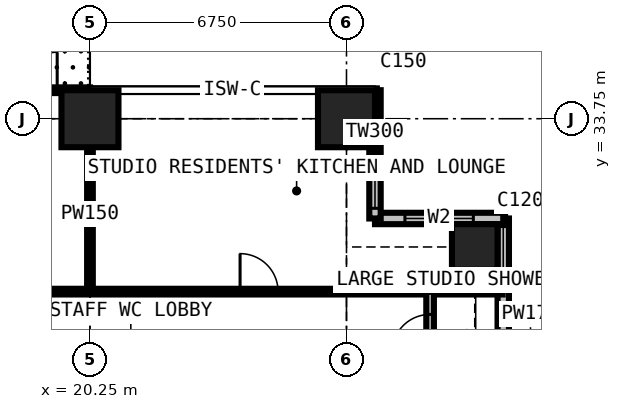
"""IFC4 building model, lengths in metres.
Left out: names, types, materials, properties, quantities, classifications, styles, units other than length and angle.
Written with IfcOpenShell. Run it as: python <this file> out.ifc"""

import sys

from ifc_helpers import new_model, si_unit, direction, frame, frame_2d, origin, origin_2d, place, context, subcontext, project, spatial, rectangle, extrude, element, fill, save


model = new_model("IFC4")
c1 = context("Model", 3, precision=1e-05, world=origin(), true_north=direction((0.0, 1.0)))
c2 = subcontext(c1, "Body", "Model", "MODEL_VIEW")
j1 = project(units=[si_unit("LENGTHUNIT", "METRE"), si_unit("PLANEANGLEUNIT", "RADIAN")], contexts=[c1])
p1 = place(None, origin())
s1 = spatial("IfcSite", under=j1, at=p1, CompositionType="ELEMENT")
p2 = place(p1, origin())
s2 = spatial("IfcBuilding", under=s1, at=p2, CompositionType="ELEMENT")
p3 = place(p2, frame((0.0, 0.0, 149.4)))
s3 = spatial("IfcBuildingStorey", under=s2, at=p3, CompositionType="ELEMENT", Elevation=149.4)
for number, where, z_axis, x_axis in (
    (1, (20.25, 33.75, 0.0), (0.0, 0.0, 1.0), (1.0, 0.0, 0.0)),
    (2, (27.0, 33.75, 0.0), (0.0, 0.0, 1.0), (1.0, 0.0, 0.0)),
):
    element("IfcColumn", number, at=place(p3, frame(where, z_axis=z_axis, x_axis=x_axis)), inside=s3, PredefinedType="COLUMN", context=c2, shape_type="SweptSolid", body=[
        extrude(rectangle(XDim=1.5, YDim=1.5, at=origin_2d()), origin(), (0.0, 0.0, 1.0), 3.6),
    ])
p4 = place(p3, frame((30.375, 30.375, 0.0), z_axis=(0.0, 0.0, 1.0), x_axis=(1.0, 0.0, 0.0)))
e3 = element("IfcColumn", 3, at=p4, inside=s3, PredefinedType="COLUMN", context=c2, shape_type="SweptSolid", body=[
    extrude(rectangle(XDim=1.2, YDim=1.2, at=origin_2d()), origin(), (0.0, 0.0, 1.0), 3.6),
])
p5 = place(p3, frame((31.125, 27.75, 0.0), z_axis=(0.0, 0.0, 1.0), x_axis=(0.0, 1.0, 0.0)))
e4 = element("IfcWall", 4, at=p5, inside=s3, PredefinedType="SOLIDWALL", context=c2, shape_type="SweptSolid", body=[
    extrude(rectangle(XDim=3.375, YDim=0.3, at=frame_2d((1.688, 0.0))), origin(), (0.0, 0.0, 1.0), 3.375),
])
p6 = place(p5, frame((1.663, 0.0, 0.9)))
e5 = element("IfcOpeningElement", 5, at=p6, cuts=e4, PredefinedType="OPENING", context=c2, shape_type="SweptSolid", body=[
    extrude(rectangle(XDim=1.5, YDim=1.8, at=frame_2d((0.75, 0.9))), frame((0.0, 0.16, 0.0), z_axis=(0.0, -1.0, 0.0), x_axis=(1.0, 0.0, 0.0)), (0.0, 0.0, 1.0), 0.32),
])
p7 = place(p3, frame((31.125, 31.125, 0.0), z_axis=(0.0, 0.0, 1.0), x_axis=(-1.0, 0.0, 0.0)))
e6 = element("IfcWall", 6, at=p7, inside=s3, PredefinedType="SOLIDWALL", context=c2, shape_type="SweptSolid", body=[
    extrude(rectangle(XDim=3.375, YDim=0.3, at=frame_2d((1.688, 0.0))), origin(), (0.0, 0.0, 1.0), 3.375),
])
p8 = place(p7, frame((0.788, 0.0, 0.6)))
e7 = element("IfcOpeningElement", 7, at=p8, cuts=e6, PredefinedType="OPENING", context=c2, shape_type="SweptSolid", body=[
    extrude(rectangle(XDim=1.8, YDim=2.1, at=frame_2d((0.9, 1.05))), frame((0.0, 0.16, 0.0), z_axis=(0.0, -1.0, 0.0), x_axis=(1.0, 0.0, 0.0)), (0.0, 0.0, 1.0), 0.32),
])
p9 = place(p3, frame((27.75, 31.125, 0.0), z_axis=(0.0, 0.0, 1.0), x_axis=(0.0, 1.0, 0.0)))
e8 = element("IfcWall", 8, at=p9, inside=s3, PredefinedType="SOLIDWALL", context=c2, shape_type="SweptSolid", body=[
    extrude(rectangle(XDim=3.375, YDim=0.3, at=frame_2d((1.688, 0.0))), origin(), (0.0, 0.0, 1.0), 3.375),
])
p10 = place(p9, frame((0.268, 0.0, 0.9)))
e9 = element("IfcOpeningElement", 9, at=p10, cuts=e8, PredefinedType="OPENING", context=c2, shape_type="SweptSolid", body=[
    extrude(rectangle(XDim=1.5, YDim=1.8, at=frame_2d((0.75, 0.9))), frame((0.0, 0.16, 0.0), z_axis=(0.0, -1.0, 0.0), x_axis=(1.0, 0.0, 0.0)), (0.0, 0.0, 1.0), 0.32),
])
p11 = place(p3, frame((13.5, 34.5, 0.0), z_axis=(0.0, 0.0, 1.0), x_axis=(1.0, 0.0, 0.0)))
e10 = element("IfcWall", 10, at=p11, inside=s3, PredefinedType="SOLIDWALL", context=c2, shape_type="SweptSolid", body=[
    extrude(rectangle(XDim=6.75, YDim=0.15, at=frame_2d((3.375, 0.0))), origin(), (0.0, 0.0, 1.0), 3.375),
])
p12 = place(p11, frame((0.863, 0.0, 0.0)))
e11 = element("IfcOpeningElement", 11, at=p12, cuts=e10, PredefinedType="OPENING", context=c2, shape_type="SweptSolid", body=[
    extrude(rectangle(XDim=1.0, YDim=2.2, at=frame_2d((0.5, 1.1))), frame((0.0, 0.085, 0.0), z_axis=(0.0, -1.0, 0.0), x_axis=(1.0, 0.0, 0.0)), (0.0, 0.0, 1.0), 0.17),
])
p13 = place(p11, frame((1.975, 0.0, 0.9)))
e12 = element("IfcOpeningElement", 12, at=p13, cuts=e10, PredefinedType="OPENING", context=c2, shape_type="SweptSolid", body=[
    extrude(rectangle(XDim=1.2, YDim=1.8, at=frame_2d((0.6, 0.9))), frame((0.0, 0.085, 0.0), z_axis=(0.0, -1.0, 0.0), x_axis=(1.0, 0.0, 0.0)), (0.0, 0.0, 1.0), 0.17),
])
p14 = place(p11, frame((4.887, 0.0, 0.0)))
e13 = element("IfcOpeningElement", 13, at=p14, cuts=e10, PredefinedType="OPENING", context=c2, shape_type="SweptSolid", body=[
    extrude(rectangle(XDim=1.0, YDim=2.2, at=frame_2d((0.5, 1.1))), frame((0.0, 0.085, 0.0), z_axis=(0.0, -1.0, 0.0), x_axis=(1.0, 0.0, 0.0)), (0.0, 0.0, 1.0), 0.17),
])
p15 = place(p11, frame((3.575, 0.0, 0.9)))
e14 = element("IfcOpeningElement", 14, at=p15, cuts=e10, PredefinedType="OPENING", context=c2, shape_type="SweptSolid", body=[
    extrude(rectangle(XDim=1.2, YDim=1.8, at=frame_2d((0.6, 0.9))), frame((0.0, 0.085, 0.0), z_axis=(0.0, -1.0, 0.0), x_axis=(1.0, 0.0, 0.0)), (0.0, 0.0, 1.0), 0.17),
])
p16 = place(p3, frame((11.3, 29.2, 0.0), z_axis=(0.0, 0.0, 1.0), x_axis=(1.0, 0.0, 0.0)))
e15 = element("IfcWall", 15, at=p16, inside=s3, PredefinedType="PARTITIONING", context=c2, shape_type="SweptSolid", body=[
    extrude(rectangle(XDim=19.809, YDim=0.15, at=frame_2d((9.904, 0.0))), origin(), (0.0, 0.0, 1.0), 3.375),
])
p17 = place(p16, frame((12.9, 0.0, 0.0)))
e16 = element("IfcOpeningElement", 16, at=p17, cuts=e15, PredefinedType="OPENING", context=c2, shape_type="SweptSolid", body=[
    extrude(rectangle(XDim=1.0, YDim=2.2, at=frame_2d((0.5, 1.1))), frame((0.0, 0.085, 0.0), z_axis=(0.0, -1.0, 0.0), x_axis=(1.0, 0.0, 0.0)), (0.0, 0.0, 1.0), 0.17),
])
p18 = place(p16, frame((6.4, 0.0, 0.0)))
e17 = element("IfcOpeningElement", 17, at=p18, cuts=e15, PredefinedType="OPENING", context=c2, shape_type="SweptSolid", body=[
    extrude(rectangle(XDim=0.95, YDim=2.2, at=frame_2d((0.475, 1.1))), frame((0.0, 0.085, 0.0), z_axis=(0.0, -1.0, 0.0), x_axis=(1.0, 0.0, 0.0)), (0.0, 0.0, 1.0), 0.17),
])
p19 = place(p16, frame((0.6, 0.0, 0.0)))
e18 = element("IfcOpeningElement", 18, at=p19, cuts=e15, PredefinedType="OPENING", context=c2, shape_type="SweptSolid", body=[
    extrude(rectangle(XDim=1.0, YDim=2.2, at=frame_2d((0.5, 1.1))), frame((0.0, 0.085, 0.0), z_axis=(0.0, -1.0, 0.0), x_axis=(1.0, 0.0, 0.0)), (0.0, 0.0, 1.0), 0.17),
])
p20 = place(p3, frame((20.25, 29.2, 0.0), z_axis=(0.0, 0.0, 1.0), x_axis=(0.0, 1.0, 0.0)))
e19 = element("IfcWall", 19, at=p20, inside=s3, PredefinedType="PARTITIONING", context=c2, shape_type="SweptSolid", body=[
    extrude(rectangle(XDim=5.284, YDim=0.15, at=frame_2d((2.642, 0.0))), origin(), (0.0, 0.0, 1.0), 2.806),
])
p21 = place(p3, frame((29.2, 13.5, 0.0), z_axis=(0.0, 0.0, 1.0), x_axis=(0.0, 1.0, 0.0)))
e20 = element("IfcWall", 20, at=p21, inside=s3, PredefinedType="PARTITIONING", context=c2, shape_type="SweptSolid", body=[
    extrude(rectangle(XDim=15.7, YDim=0.2, at=frame_2d((7.85, 0.0))), origin(), (0.0, 0.0, 1.0), 3.375),
])
p22 = place(p21, frame((8.35, 0.0, 0.0)))
e21 = element("IfcOpeningElement", 21, at=p22, cuts=e20, PredefinedType="OPENING", context=c2, shape_type="SweptSolid", body=[
    extrude(rectangle(XDim=0.95, YDim=2.2, at=frame_2d((0.475, 1.1))), frame((0.0, 0.11, 0.0), z_axis=(0.0, -1.0, 0.0), x_axis=(1.0, 0.0, 0.0)), (0.0, 0.0, 1.0), 0.22),
])
p23 = place(p21, frame((1.6, 0.0, 0.0)))
e22 = element("IfcOpeningElement", 22, at=p23, cuts=e20, PredefinedType="OPENING", context=c2, shape_type="SweptSolid", body=[
    extrude(rectangle(XDim=0.95, YDim=2.2, at=frame_2d((0.475, 1.1))), frame((0.0, 0.11, 0.0), z_axis=(0.0, -1.0, 0.0), x_axis=(1.0, 0.0, 0.0)), (0.0, 0.0, 1.0), 0.22),
])
p24 = place(p21, frame((14.1, 0.0, 0.0)))
e23 = element("IfcOpeningElement", 23, at=p24, cuts=e20, PredefinedType="OPENING", context=c2, shape_type="SweptSolid", body=[
    extrude(rectangle(XDim=1.0, YDim=2.2, at=frame_2d((0.5, 1.1))), frame((0.0, 0.11, 0.0), z_axis=(0.0, -1.0, 0.0), x_axis=(1.0, 0.0, 0.0)), (0.0, 0.0, 1.0), 0.22),
])
p25 = place(p6, origin())
e24 = element("IfcWindow", 24, at=p25, inside=s3, PartitioningType="SINGLE_PANEL", PredefinedType="WINDOW", context=c2, shape_type="SweptSolid", body=[
    extrude(rectangle(XDim=1.5, YDim=1.8, at=frame_2d((0.75, 0.9))), frame((0.0, 0.03, 0.0), z_axis=(0.0, -1.0, 0.0), x_axis=(1.0, 0.0, 0.0)), (0.0, 0.0, 1.0), 0.06),
])
fill(e5, e24)
p26 = place(p8, origin())
e25 = element("IfcWindow", 25, at=p26, inside=s3, PartitioningType="SINGLE_PANEL", PredefinedType="WINDOW", context=c2, shape_type="SweptSolid", body=[
    extrude(rectangle(XDim=1.8, YDim=2.1, at=frame_2d((0.9, 1.05))), frame((0.0, 0.03, 0.0), z_axis=(0.0, -1.0, 0.0), x_axis=(1.0, 0.0, 0.0)), (0.0, 0.0, 1.0), 0.06),
])
fill(e7, e25)
p27 = place(p10, origin())
e26 = element("IfcWindow", 26, at=p27, inside=s3, PartitioningType="SINGLE_PANEL", PredefinedType="WINDOW", context=c2, shape_type="SweptSolid", body=[
    extrude(rectangle(XDim=1.5, YDim=1.8, at=frame_2d((0.75, 0.9))), frame((0.0, 0.03, 0.0), z_axis=(0.0, -1.0, 0.0), x_axis=(1.0, 0.0, 0.0)), (0.0, 0.0, 1.0), 0.06),
])
fill(e9, e26)
p28 = place(p14, origin())
e27 = element("IfcDoor", 27, at=p28, inside=s3, OperationType="SINGLE_SWING_RIGHT", PredefinedType="DOOR", context=c2, shape_type="SweptSolid", body=[
    extrude(rectangle(XDim=1.0, YDim=2.2, at=frame_2d((0.5, 1.1))), frame((0.0, 0.025, 0.0), z_axis=(0.0, -1.0, 0.0), x_axis=(1.0, 0.0, 0.0)), (0.0, 0.0, 1.0), 0.05),
])
fill(e13, e27)
p29 = place(p24, origin())
e28 = element("IfcDoor", 28, at=p29, inside=s3, OperationType="SINGLE_SWING_LEFT", PredefinedType="DOOR", context=c2, shape_type="SweptSolid", body=[
    extrude(rectangle(XDim=1.0, YDim=2.2, at=frame_2d((0.5, 1.1))), frame((0.0, 0.025, 0.0), z_axis=(0.0, -1.0, 0.0), x_axis=(1.0, 0.0, 0.0)), (0.0, 0.0, 1.0), 0.05),
])
fill(e23, e28)
p30 = place(p17, origin())
e29 = element("IfcDoor", 29, at=p30, inside=s3, OperationType="SINGLE_SWING_LEFT", PredefinedType="DOOR", context=c2, shape_type="SweptSolid", body=[
    extrude(rectangle(XDim=1.0, YDim=2.2, at=frame_2d((0.5, 1.1))), frame((0.0, 0.025, 0.0), z_axis=(0.0, -1.0, 0.0), x_axis=(1.0, 0.0, 0.0)), (0.0, 0.0, 1.0), 0.05),
])
fill(e16, e29)
save(model, sys.argv[1])
